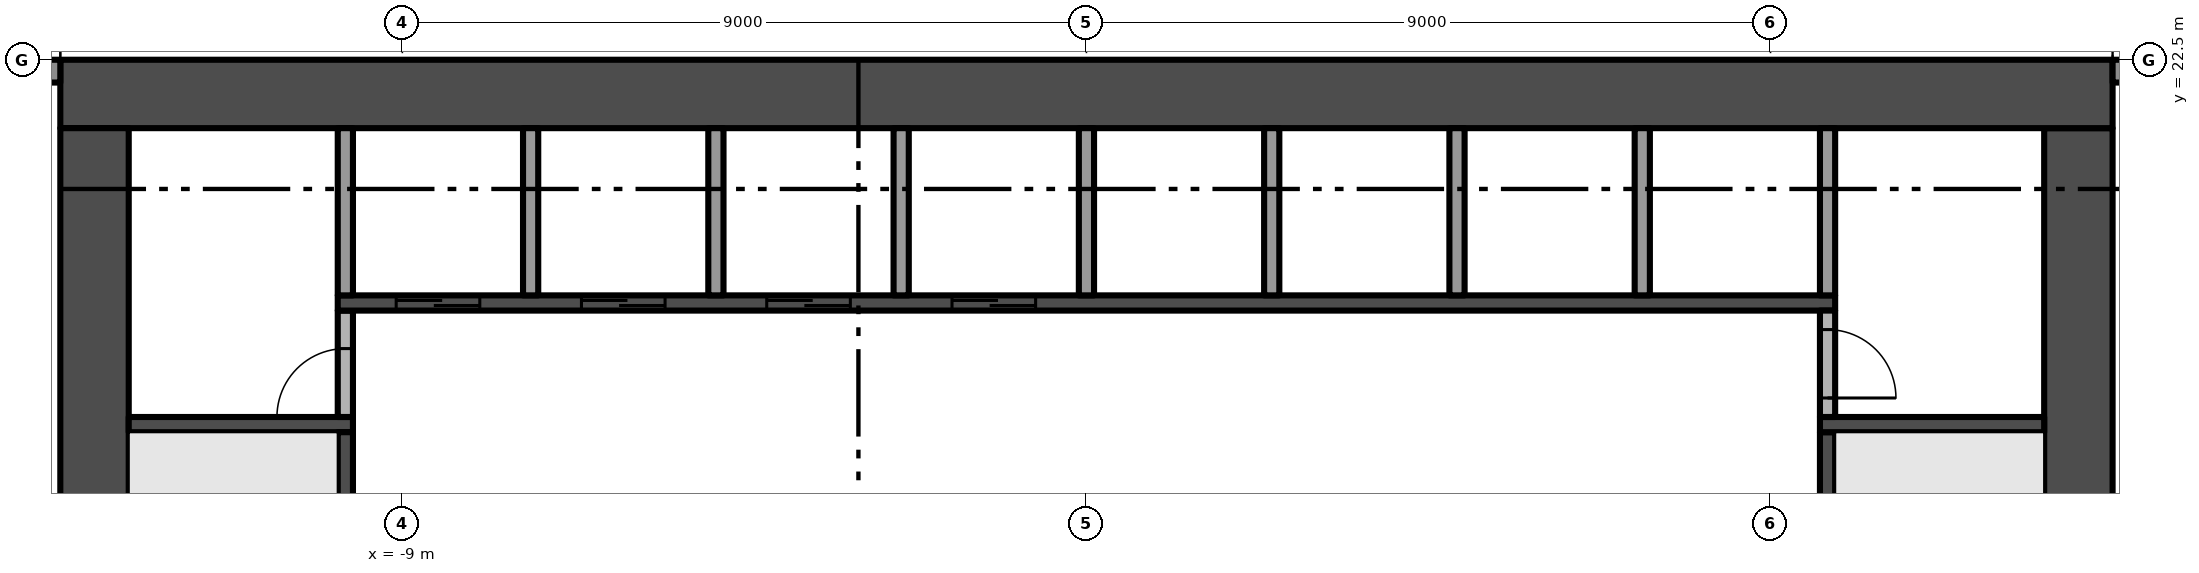
"""IFC4 building model, lengths in metres.
Left out: names, types, materials, properties, quantities, classifications, styles, units other than length and angle.
Written with IfcOpenShell. Run it as: python <this file> out.ifc"""

import sys

from ifc_helpers import new_model, si_unit, direction, frame, frame_2d, origin, place, context, subcontext, project, spatial, rectangle, extrude, element, fill, save


model = new_model("IFC4")
c1 = context("Model", 3, precision=1e-05, world=origin(), true_north=direction((0.0, 1.0)))
c2 = subcontext(c1, "Body", "Model", "MODEL_VIEW")
j1 = project(units=[si_unit("LENGTHUNIT", "METRE"), si_unit("PLANEANGLEUNIT", "RADIAN")], contexts=[c1])
p1 = place(None, origin())
s1 = spatial("IfcSite", under=j1, at=p1, CompositionType="ELEMENT")
p2 = place(p1, origin())
s2 = spatial("IfcBuilding", under=s1, at=p2, CompositionType="ELEMENT")
p3 = place(p2, frame((0.0, 0.0, 41.6)))
s3 = spatial("IfcBuildingStorey", under=s2, at=p3, CompositionType="ELEMENT", Elevation=41.6)
p4 = place(p3, frame((13.05, 5.4, -0.3), z_axis=(0.0, 0.0, 1.0), x_axis=(0.0, 1.0, 0.0)))
e1 = element("IfcWall", 1, at=p4, inside=s3, PredefinedType="SHEAR", context=c2, shape_type="SweptSolid", body=[
    extrude(rectangle(XDim=16.2, YDim=0.9, at=frame_2d((8.1, 0.0))), origin(), (0.0, 0.0, 1.0), 3.8),
])
p5 = place(p4, frame((6.0, 0.0, 0.3)))
e2 = element("IfcOpeningElement", 2, at=p5, cuts=e1, PredefinedType="OPENING", context=c2, shape_type="SweptSolid", body=[
    extrude(rectangle(XDim=1.2, YDim=2.2, at=frame_2d((0.6, 1.1))), frame((0.0, 0.46, 0.0), z_axis=(0.0, -1.0, 0.0), x_axis=(1.0, 0.0, 0.0)), (0.0, 0.0, 1.0), 0.92),
])
p6 = place(p3, frame((13.5, 22.05, -0.3), z_axis=(0.0, 0.0, 1.0), x_axis=(-1.0, 0.0, 0.0)))
e3 = element("IfcWall", 3, at=p6, inside=s3, PredefinedType="SHEAR", context=c2, shape_type="SweptSolid", body=[
    extrude(rectangle(XDim=27.0, YDim=0.9, at=frame_2d((13.5, 0.0))), origin(), (0.0, 0.0, 1.0), 3.8),
])
p7 = place(p3, frame((-13.05, 21.6, -0.3), z_axis=(0.0, 0.0, 1.0), x_axis=(0.0, -1.0, 0.0)))
e4 = element("IfcWall", 4, at=p7, inside=s3, PredefinedType="SHEAR", context=c2, shape_type="SweptSolid", body=[
    extrude(rectangle(XDim=16.2, YDim=0.9, at=frame_2d((8.1, 0.0))), origin(), (0.0, 0.0, 1.0), 3.8),
])
p8 = place(p7, frame((9.0, 0.0, 0.3)))
e5 = element("IfcOpeningElement", 5, at=p8, cuts=e4, PredefinedType="OPENING", context=c2, shape_type="SweptSolid", body=[
    extrude(rectangle(XDim=1.2, YDim=2.2, at=frame_2d((0.6, 1.1))), frame((0.0, 0.46, 0.0), z_axis=(0.0, -1.0, 0.0), x_axis=(1.0, 0.0, 0.0)), (0.0, 0.0, 1.0), 0.92),
])
p9 = place(p3, frame((13.5, 22.35, 0.0), z_axis=(0.0, 0.0, 1.0), x_axis=(1.0, 0.0, 0.0)))
e6 = element("IfcWall", 6, at=p9, inside=s3, PredefinedType="SOLIDWALL", context=c2, shape_type="SweptSolid", body=[
    extrude(rectangle(XDim=3.8, YDim=0.3, at=frame_2d((1.9, 0.0))), origin(), (0.0, 0.0, 1.0), 3.5),
])
p10 = place(p9, frame((0.85, 0.0, 0.0)))
e7 = element("IfcOpeningElement", 7, at=p10, cuts=e6, PredefinedType="OPENING", context=c2, shape_type="SweptSolid", body=[
    extrude(rectangle(XDim=2.65, YDim=2.4, at=frame_2d((1.325, 1.2))), frame((0.0, 0.16, 0.0), z_axis=(0.0, -1.0, 0.0), x_axis=(1.0, 0.0, 0.0)), (0.0, 0.0, 1.0), 0.32),
])
p11 = place(p3, frame((-17.3, 22.35, 0.0), z_axis=(0.0, 0.0, 1.0), x_axis=(1.0, 0.0, 0.0)))
e8 = element("IfcWall", 8, at=p11, inside=s3, PredefinedType="SOLIDWALL", context=c2, shape_type="SweptSolid", body=[
    extrude(rectangle(XDim=3.8, YDim=0.3, at=frame_2d((1.9, 0.0))), origin(), (0.0, 0.0, 1.0), 3.5),
])
p12 = place(p11, frame((0.3, 0.0, 0.45)))
e9 = element("IfcOpeningElement", 9, at=p12, cuts=e8, PredefinedType="OPENING", context=c2, shape_type="SweptSolid", body=[
    extrude(rectangle(XDim=2.65, YDim=2.65, at=frame_2d((1.325, 1.325))), frame((0.0, 0.16, 0.0), z_axis=(0.0, -1.0, 0.0), x_axis=(1.0, 0.0, 0.0)), (0.0, 0.0, 1.0), 0.32),
])
p13 = place(p3, frame((-12.6, 17.7, 0.0), z_axis=(0.0, 0.0, 1.0), x_axis=(1.0, 0.0, 0.0)))
e10 = element("IfcWall", 10, at=p13, inside=s3, PredefinedType="SHEAR", context=c2, shape_type="SweptSolid", body=[
    extrude(rectangle(XDim=2.95, YDim=0.2, at=frame_2d((1.475, 0.0))), origin(), (0.0, 0.0, 1.0), 3.5),
])
p14 = place(p3, frame((-9.75, 16.1, 0.0), z_axis=(0.0, 0.0, 1.0), x_axis=(0.0, 1.0, 0.0)))
e11 = element("IfcWall", 11, at=p14, inside=s3, PredefinedType="SHEAR", context=c2, shape_type="SweptSolid", body=[
    extrude(rectangle(XDim=1.5, YDim=0.2, at=frame_2d((0.75, 0.0))), origin(), (0.0, 0.0, 1.0), 3.5),
])
p15 = place(p3, frame((-9.75, 17.8, 0.0), z_axis=(0.0, 0.0, 1.0), x_axis=(0.0, 1.0, 0.0)))
e12 = element("IfcWall", 12, at=p15, inside=s3, PredefinedType="PARTITIONING", context=c2, shape_type="SweptSolid", body=[
    extrude(rectangle(XDim=1.4, YDim=0.2, at=frame_2d((0.7, 0.0))), origin(), (0.0, 0.0, 1.0), 3.5),
])
p16 = place(p15, origin())
e13 = element("IfcOpeningElement", 13, at=p16, cuts=e12, PredefinedType="OPENING", context=c2, shape_type="SweptSolid", body=[
    extrude(rectangle(XDim=0.9, YDim=2.1, at=frame_2d((0.45, 1.05))), frame((0.0, 0.11, 0.0), z_axis=(0.0, -1.0, 0.0), x_axis=(1.0, 0.0, 0.0)), (0.0, 0.0, 1.0), 0.22),
])
p17 = place(p3, frame((-9.85, 19.3, 0.0), z_axis=(0.0, 0.0, 1.0), x_axis=(1.0, 0.0, 0.0)))
e14 = element("IfcWall", 14, at=p17, inside=s3, PredefinedType="SHEAR", context=c2, shape_type="SweptSolid", body=[
    extrude(rectangle(XDim=19.7, YDim=0.2, at=frame_2d((9.85, 0.0))), origin(), (0.0, 0.0, 1.0), 3.5),
])
p18 = place(p17, frame((0.769, 0.0, 0.0)))
e15 = element("IfcOpeningElement", 15, at=p18, cuts=e14, PredefinedType="OPENING", context=c2, shape_type="SweptSolid", body=[
    extrude(rectangle(XDim=1.1, YDim=2.1, at=frame_2d((0.55, 1.05))), frame((0.0, 0.11, 0.0), z_axis=(0.0, -1.0, 0.0), x_axis=(1.0, 0.0, 0.0)), (0.0, 0.0, 1.0), 0.22),
])
p19 = place(p17, frame((3.206, 0.0, 0.0)))
e16 = element("IfcOpeningElement", 16, at=p19, cuts=e14, PredefinedType="OPENING", context=c2, shape_type="SweptSolid", body=[
    extrude(rectangle(XDim=1.1, YDim=2.1, at=frame_2d((0.55, 1.05))), frame((0.0, 0.11, 0.0), z_axis=(0.0, -1.0, 0.0), x_axis=(1.0, 0.0, 0.0)), (0.0, 0.0, 1.0), 0.22),
])
p20 = place(p17, frame((5.644, 0.0, 0.0)))
e17 = element("IfcOpeningElement", 17, at=p20, cuts=e14, PredefinedType="OPENING", context=c2, shape_type="SweptSolid", body=[
    extrude(rectangle(XDim=1.1, YDim=2.1, at=frame_2d((0.55, 1.05))), frame((0.0, 0.11, 0.0), z_axis=(0.0, -1.0, 0.0), x_axis=(1.0, 0.0, 0.0)), (0.0, 0.0, 1.0), 0.22),
])
p21 = place(p17, frame((8.081, 0.0, 0.0)))
e18 = element("IfcOpeningElement", 18, at=p21, cuts=e14, PredefinedType="OPENING", context=c2, shape_type="SweptSolid", body=[
    extrude(rectangle(XDim=1.1, YDim=2.1, at=frame_2d((0.55, 1.05))), frame((0.0, 0.11, 0.0), z_axis=(0.0, -1.0, 0.0), x_axis=(1.0, 0.0, 0.0)), (0.0, 0.0, 1.0), 0.22),
])
for number, where, z_axis, x_axis in (
    (19, (-9.75, 19.4, 0.0), (0.0, 0.0, 1.0), (0.0, 1.0, 0.0)),
    (20, (-7.312, 19.4, 0.0), (0.0, 0.0, 1.0), (0.0, 1.0, 0.0)),
    (21, (-4.875, 19.4, 0.0), (0.0, 0.0, 1.0), (0.0, 1.0, 0.0)),
    (22, (-2.438, 19.4, 0.0), (0.0, 0.0, 1.0), (0.0, 1.0, 0.0)),
    (23, (0.0, 19.4, 0.0), (0.0, 0.0, 1.0), (0.0, 1.0, 0.0)),
    (24, (2.438, 19.4, 0.0), (0.0, 0.0, 1.0), (0.0, 1.0, 0.0)),
    (25, (4.875, 19.4, 0.0), (0.0, 0.0, 1.0), (0.0, 1.0, 0.0)),
    (26, (7.312, 19.4, 0.0), (0.0, 0.0, 1.0), (0.0, 1.0, 0.0)),
):
    element("IfcWall", number, at=place(p3, frame(where, z_axis=z_axis, x_axis=x_axis)), inside=s3, PredefinedType="PARTITIONING", context=c2, shape_type="SweptSolid", body=[
        extrude(rectangle(XDim=2.2, YDim=0.2, at=frame_2d((1.1, 0.0))), origin(), (0.0, 0.0, 1.0), 3.5),
    ])
p22 = place(p3, frame((9.75, 16.1, 0.0), z_axis=(0.0, 0.0, 1.0), x_axis=(0.0, 1.0, 0.0)))
e27 = element("IfcWall", 27, at=p22, inside=s3, PredefinedType="SHEAR", context=c2, shape_type="SweptSolid", body=[
    extrude(rectangle(XDim=1.5, YDim=0.2, at=frame_2d((0.75, 0.0))), origin(), (0.0, 0.0, 1.0), 3.5),
])
p23 = place(p3, frame((9.65, 17.7, 0.0), z_axis=(0.0, 0.0, 1.0), x_axis=(1.0, 0.0, 0.0)))
e28 = element("IfcWall", 28, at=p23, inside=s3, PredefinedType="SHEAR", context=c2, shape_type="SweptSolid", body=[
    extrude(rectangle(XDim=2.95, YDim=0.2, at=frame_2d((1.475, 0.0))), origin(), (0.0, 0.0, 1.0), 3.5),
])
p24 = place(p3, frame((9.75, 19.2, 0.0), z_axis=(0.0, 0.0, 1.0), x_axis=(0.0, -1.0, 0.0)))
e29 = element("IfcWall", 29, at=p24, inside=s3, PredefinedType="PARTITIONING", context=c2, shape_type="SweptSolid", body=[
    extrude(rectangle(XDim=1.4, YDim=0.2, at=frame_2d((0.7, 0.0))), origin(), (0.0, 0.0, 1.0), 3.5),
])
p25 = place(p24, frame((0.25, 0.0, 0.0)))
e30 = element("IfcOpeningElement", 30, at=p25, cuts=e29, PredefinedType="OPENING", context=c2, shape_type="SweptSolid", body=[
    extrude(rectangle(XDim=0.9, YDim=2.1, at=frame_2d((0.45, 1.05))), frame((0.0, 0.11, 0.0), z_axis=(0.0, -1.0, 0.0), x_axis=(1.0, 0.0, 0.0)), (0.0, 0.0, 1.0), 0.22),
])
p26 = place(p3, frame((9.75, 19.4, 0.0), z_axis=(0.0, 0.0, 1.0), x_axis=(0.0, 1.0, 0.0)))
e31 = element("IfcWall", 31, at=p26, inside=s3, PredefinedType="PARTITIONING", context=c2, shape_type="SweptSolid", body=[
    extrude(rectangle(XDim=2.2, YDim=0.2, at=frame_2d((1.1, 0.0))), origin(), (0.0, 0.0, 1.0), 3.5),
])
p27 = place(p18, origin())
e32 = element("IfcDoor", 32, at=p27, inside=s3, OperationType="SLIDING_TO_LEFT", PredefinedType="DOOR", context=c2, shape_type="SweptSolid", body=[
    extrude(rectangle(XDim=1.1, YDim=2.1, at=frame_2d((0.55, 1.05))), frame((0.0, 0.025, 0.0), z_axis=(0.0, -1.0, 0.0), x_axis=(1.0, 0.0, 0.0)), (0.0, 0.0, 1.0), 0.05),
])
fill(e15, e32)
p28 = place(p19, origin())
e33 = element("IfcDoor", 33, at=p28, inside=s3, OperationType="SLIDING_TO_LEFT", PredefinedType="DOOR", context=c2, shape_type="SweptSolid", body=[
    extrude(rectangle(XDim=1.1, YDim=2.1, at=frame_2d((0.55, 1.05))), frame((0.0, 0.025, 0.0), z_axis=(0.0, -1.0, 0.0), x_axis=(1.0, 0.0, 0.0)), (0.0, 0.0, 1.0), 0.05),
])
fill(e16, e33)
p29 = place(p20, origin())
e34 = element("IfcDoor", 34, at=p29, inside=s3, OperationType="SLIDING_TO_LEFT", PredefinedType="DOOR", context=c2, shape_type="SweptSolid", body=[
    extrude(rectangle(XDim=1.1, YDim=2.1, at=frame_2d((0.55, 1.05))), frame((0.0, 0.025, 0.0), z_axis=(0.0, -1.0, 0.0), x_axis=(1.0, 0.0, 0.0)), (0.0, 0.0, 1.0), 0.05),
])
fill(e17, e34)
p30 = place(p21, origin())
e35 = element("IfcDoor", 35, at=p30, inside=s3, OperationType="SLIDING_TO_LEFT", PredefinedType="DOOR", context=c2, shape_type="SweptSolid", body=[
    extrude(rectangle(XDim=1.1, YDim=2.1, at=frame_2d((0.55, 1.05))), frame((0.0, 0.025, 0.0), z_axis=(0.0, -1.0, 0.0), x_axis=(1.0, 0.0, 0.0)), (0.0, 0.0, 1.0), 0.05),
])
fill(e18, e35)
p31 = place(p16, origin())
e36 = element("IfcDoor", 36, at=p31, inside=s3, OperationType="SINGLE_SWING_LEFT", PredefinedType="DOOR", context=c2, shape_type="SweptSolid", body=[
    extrude(rectangle(XDim=0.9, YDim=2.1, at=frame_2d((0.45, 1.05))), frame((0.0, 0.025, 0.0), z_axis=(0.0, -1.0, 0.0), x_axis=(1.0, 0.0, 0.0)), (0.0, 0.0, 1.0), 0.05),
])
fill(e13, e36)
p32 = place(p25, origin())
e37 = element("IfcDoor", 37, at=p32, inside=s3, OperationType="SINGLE_SWING_RIGHT", PredefinedType="DOOR", context=c2, shape_type="SweptSolid", body=[
    extrude(rectangle(XDim=0.9, YDim=2.1, at=frame_2d((0.45, 1.05))), frame((0.0, 0.025, 0.0), z_axis=(0.0, -1.0, 0.0), x_axis=(1.0, 0.0, 0.0)), (0.0, 0.0, 1.0), 0.05),
])
fill(e30, e37)
save(model, sys.argv[1])
